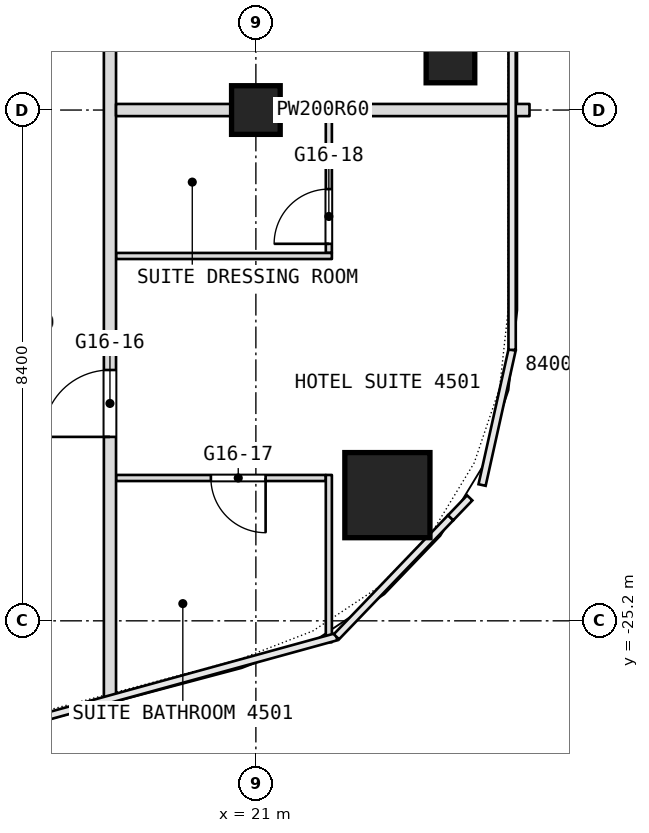
"""IFC4 building model, lengths in metres.
Left out: names, types, materials, properties, quantities, classifications, styles, units other than length and angle.
Written with IfcOpenShell. Run it as: python <this file> out.ifc"""

import sys

from ifc_helpers import new_model, si_unit, direction, frame, frame_2d, origin, origin_2d, place, context, subcontext, project, spatial, rectangle, extrude, element, fill, save


model = new_model("IFC4")
c1 = context("Model", 3, precision=1e-05, world=origin(), true_north=direction((0.0, 1.0)))
c2 = subcontext(c1, "Body", "Model", "MODEL_VIEW")
j1 = project(units=[si_unit("LENGTHUNIT", "METRE"), si_unit("PLANEANGLEUNIT", "RADIAN")], contexts=[c1])
p1 = place(None, origin())
s1 = spatial("IfcSite", under=j1, at=p1, CompositionType="ELEMENT")
p2 = place(p1, origin())
s2 = spatial("IfcBuilding", under=s1, at=p2, CompositionType="ELEMENT")
p3 = place(p2, frame((0.0, 0.0, 198.5)))
s3 = spatial("IfcBuildingStorey", under=s2, at=p3, CompositionType="ELEMENT", Elevation=198.5)
p4 = place(p3, frame((23.163, -23.133, 0.0), z_axis=(0.0, 0.0, 1.0), x_axis=(1.0, 0.0, 0.0)))
e1 = element("IfcColumn", 1, at=p4, inside=s3, PredefinedType="COLUMN", context=c2, shape_type="SweptSolid", body=[
    extrude(rectangle(XDim=1.4, YDim=1.4, at=origin_2d()), origin(), (0.0, 0.0, 1.0), 3.6),
])
for number, where, z_axis, x_axis in (
    (2, (21.0, -16.8, 0.0), (0.0, 0.0, 1.0), (1.0, 0.0, 0.0)),
    (3, (24.2, -15.952, 0.0), (0.0, 0.0, 1.0), (1.0, 0.0, 0.0)),
):
    element("IfcColumn", number, at=place(p3, frame(where, z_axis=z_axis, x_axis=x_axis)), inside=s3, PredefinedType="COLUMN", context=c2, shape_type="SweptSolid", body=[
        extrude(rectangle(XDim=0.8, YDim=0.8, at=origin_2d()), origin(), (0.0, 0.0, 1.0), 3.6),
    ])
p5 = place(p3, frame((18.7, -22.851, 0.0), z_axis=(0.0, 0.0, 1.0), x_axis=(1.0, 0.0, 0.0)))
e4 = element("IfcWall", 4, at=p5, inside=s3, PredefinedType="PARTITIONING", context=c2, shape_type="SweptSolid", body=[
    extrude(rectangle(XDim=3.45, YDim=0.1, at=frame_2d((1.725, 0.0))), origin(), (0.0, 0.0, 1.0), 3.34),
])
p6 = place(p5, frame((1.56, 0.0, 0.0)))
e5 = element("IfcOpeningElement", 5, at=p6, cuts=e4, PredefinedType="OPENING", context=c2, shape_type="SweptSolid", body=[
    extrude(rectangle(XDim=0.9, YDim=2.1, at=frame_2d((0.45, 1.05))), frame((0.0, 0.05, 0.0), z_axis=(0.0, -1.0, 0.0), x_axis=(1.0, 0.0, 0.0)), (0.0, 0.0, 1.0), 0.1),
])
p7 = place(p3, frame((22.2, -25.552, 0.0), z_axis=(0.0, 0.0, 1.0), x_axis=(0.0, 1.0, 0.0)))
e6 = element("IfcWall", 6, at=p7, inside=s3, PredefinedType="PARTITIONING", context=c2, shape_type="SweptSolid", body=[
    extrude(rectangle(XDim=2.751, YDim=0.1, at=frame_2d((1.375, 0.0))), origin(), (0.0, 0.0, 1.0), 3.34),
])
p8 = place(p3, frame((22.2, -19.15, 0.0), z_axis=(0.0, 0.0, 1.0), x_axis=(0.0, 1.0, 0.0)))
e7 = element("IfcWall", 7, at=p8, inside=s3, PredefinedType="PARTITIONING", context=c2, shape_type="SweptSolid", body=[
    extrude(rectangle(XDim=2.45, YDim=0.1, at=frame_2d((1.225, 0.0))), origin(), (0.0, 0.0, 1.0), 3.34),
])
p9 = place(p8, frame((0.15, 0.0, 0.0)))
e8 = element("IfcOpeningElement", 8, at=p9, cuts=e7, PredefinedType="OPENING", context=c2, shape_type="SweptSolid", body=[
    extrude(rectangle(XDim=0.9, YDim=2.1, at=frame_2d((0.45, 1.05))), frame((0.0, 0.05, 0.0), z_axis=(0.0, -1.0, 0.0), x_axis=(1.0, 0.0, 0.0)), (0.0, 0.0, 1.0), 0.1),
])
p10 = place(p3, frame((18.7, -19.2, 0.0), z_axis=(0.0, 0.0, 1.0), x_axis=(1.0, 0.0, 0.0)))
e9 = element("IfcWall", 9, at=p10, inside=s3, PredefinedType="PARTITIONING", context=c2, shape_type="SweptSolid", body=[
    extrude(rectangle(XDim=3.55, YDim=0.1, at=frame_2d((1.775, 0.0))), origin(), (0.0, 0.0, 1.0), 3.34),
])
p11 = place(p3, frame((18.6, -26.751, 0.0), z_axis=(0.0, 0.0, 1.0), x_axis=(0.0, 1.0, 0.0)))
e10 = element("IfcWall", 10, at=p11, inside=s3, PredefinedType="PARTITIONING", context=c2, shape_type="SweptSolid", body=[
    extrude(rectangle(XDim=49.091, YDim=0.2, at=frame_2d((24.545, 0.0))), origin(), (0.0, 0.0, 1.0), 3.34),
])
p12 = place(p11, frame((4.576, 0.0, 0.0)))
e11 = element("IfcOpeningElement", 11, at=p12, cuts=e10, PredefinedType="OPENING", context=c2, shape_type="SweptSolid", body=[
    extrude(rectangle(XDim=1.1, YDim=2.1, at=frame_2d((0.55, 1.05))), frame((0.0, 0.1, 0.0), z_axis=(0.0, -1.0, 0.0), x_axis=(1.0, 0.0, 0.0)), (0.0, 0.0, 1.0), 0.2),
])
p13 = place(p11, frame((13.251, 0.0, 0.0)))
e12 = element("IfcOpeningElement", 12, at=p13, cuts=e10, PredefinedType="OPENING", context=c2, shape_type="SweptSolid", body=[
    extrude(rectangle(XDim=1.8, YDim=2.1, at=frame_2d((0.9, 1.05))), frame((0.0, 0.1, 0.0), z_axis=(0.0, -1.0, 0.0), x_axis=(1.0, 0.0, 0.0)), (0.0, 0.0, 1.0), 0.2),
])
p14 = place(p11, frame((24.101, 0.0, 0.0)))
e13 = element("IfcOpeningElement", 13, at=p14, cuts=e10, PredefinedType="OPENING", context=c2, shape_type="SweptSolid", body=[
    extrude(rectangle(XDim=1.1, YDim=2.1, at=frame_2d((0.55, 1.05))), frame((0.0, 0.1, 0.0), z_axis=(0.0, -1.0, 0.0), x_axis=(1.0, 0.0, 0.0)), (0.0, 0.0, 1.0), 0.2),
])
p15 = place(p11, frame((30.051, 0.0, 0.0)))
e14 = element("IfcOpeningElement", 14, at=p15, cuts=e10, PredefinedType="OPENING", context=c2, shape_type="SweptSolid", body=[
    extrude(rectangle(XDim=1.8, YDim=2.1, at=frame_2d((0.9, 1.05))), frame((0.0, 0.1, 0.0), z_axis=(0.0, -1.0, 0.0), x_axis=(1.0, 0.0, 0.0)), (0.0, 0.0, 1.0), 0.2),
])
p16 = place(p11, frame((37.951, 0.0, 0.0)))
e15 = element("IfcOpeningElement", 15, at=p16, cuts=e10, PredefinedType="OPENING", context=c2, shape_type="SweptSolid", body=[
    extrude(rectangle(XDim=1.0, YDim=2.1, at=frame_2d((0.5, 1.05))), frame((0.0, 0.1, 0.0), z_axis=(0.0, -1.0, 0.0), x_axis=(1.0, 0.0, 0.0)), (0.0, 0.0, 1.0), 0.2),
])
p17 = place(p11, frame((39.751, 0.0, 0.0)))
e16 = element("IfcOpeningElement", 16, at=p17, cuts=e10, PredefinedType="OPENING", context=c2, shape_type="SweptSolid", body=[
    extrude(rectangle(XDim=1.0, YDim=2.1, at=frame_2d((0.5, 1.05))), frame((0.0, 0.1, 0.0), z_axis=(0.0, -1.0, 0.0), x_axis=(1.0, 0.0, 0.0)), (0.0, 0.0, 1.0), 0.2),
])
p18 = place(p11, frame((45.851, 0.0, 0.0)))
e17 = element("IfcOpeningElement", 17, at=p18, cuts=e10, PredefinedType="OPENING", context=c2, shape_type="SweptSolid", body=[
    extrude(rectangle(XDim=1.0, YDim=2.1, at=frame_2d((0.5, 1.05))), frame((0.0, 0.1, 0.0), z_axis=(0.0, -1.0, 0.0), x_axis=(1.0, 0.0, 0.0)), (0.0, 0.0, 1.0), 0.2),
])
p19 = place(p3, frame((18.7, -16.8, 0.0), z_axis=(0.0, 0.0, 1.0), x_axis=(1.0, 0.0, 0.0)))
e18 = element("IfcWall", 18, at=p19, inside=s3, PredefinedType="PARTITIONING", context=c2, shape_type="SweptSolid", body=[
    extrude(rectangle(XDim=6.8, YDim=0.2, at=frame_2d((3.4, 0.0))), origin(), (0.0, 0.0, 1.0), 2.94),
])
p20 = place(p6, origin())
e19 = element("IfcDoor", 19, at=p20, inside=s3, OperationType="SINGLE_SWING_LEFT", PredefinedType="DOOR", context=c2, shape_type="SweptSolid", body=[
    extrude(rectangle(XDim=0.9, YDim=2.1, at=frame_2d((0.45, 1.05))), frame((0.0, 0.025, 0.0), z_axis=(0.0, -1.0, 0.0), x_axis=(1.0, 0.0, 0.0)), (0.0, 0.0, 1.0), 0.05),
])
fill(e5, e19)
p21 = place(p9, origin())
e20 = element("IfcDoor", 20, at=p21, inside=s3, OperationType="SINGLE_SWING_LEFT", PredefinedType="DOOR", context=c2, shape_type="SweptSolid", body=[
    extrude(rectangle(XDim=0.9, YDim=2.1, at=frame_2d((0.45, 1.05))), frame((0.0, 0.025, 0.0), z_axis=(0.0, -1.0, 0.0), x_axis=(1.0, 0.0, 0.0)), (0.0, 0.0, 1.0), 0.05),
])
fill(e8, e20)
p22 = place(p12, origin())
e21 = element("IfcDoor", 21, at=p22, inside=s3, OperationType="SINGLE_SWING_RIGHT", PredefinedType="DOOR", context=c2, shape_type="SweptSolid", body=[
    extrude(rectangle(XDim=1.1, YDim=2.1, at=frame_2d((0.55, 1.05))), frame((0.0, 0.025, 0.0), z_axis=(0.0, -1.0, 0.0), x_axis=(1.0, 0.0, 0.0)), (0.0, 0.0, 1.0), 0.05),
])
fill(e11, e21)
save(model, sys.argv[1])
